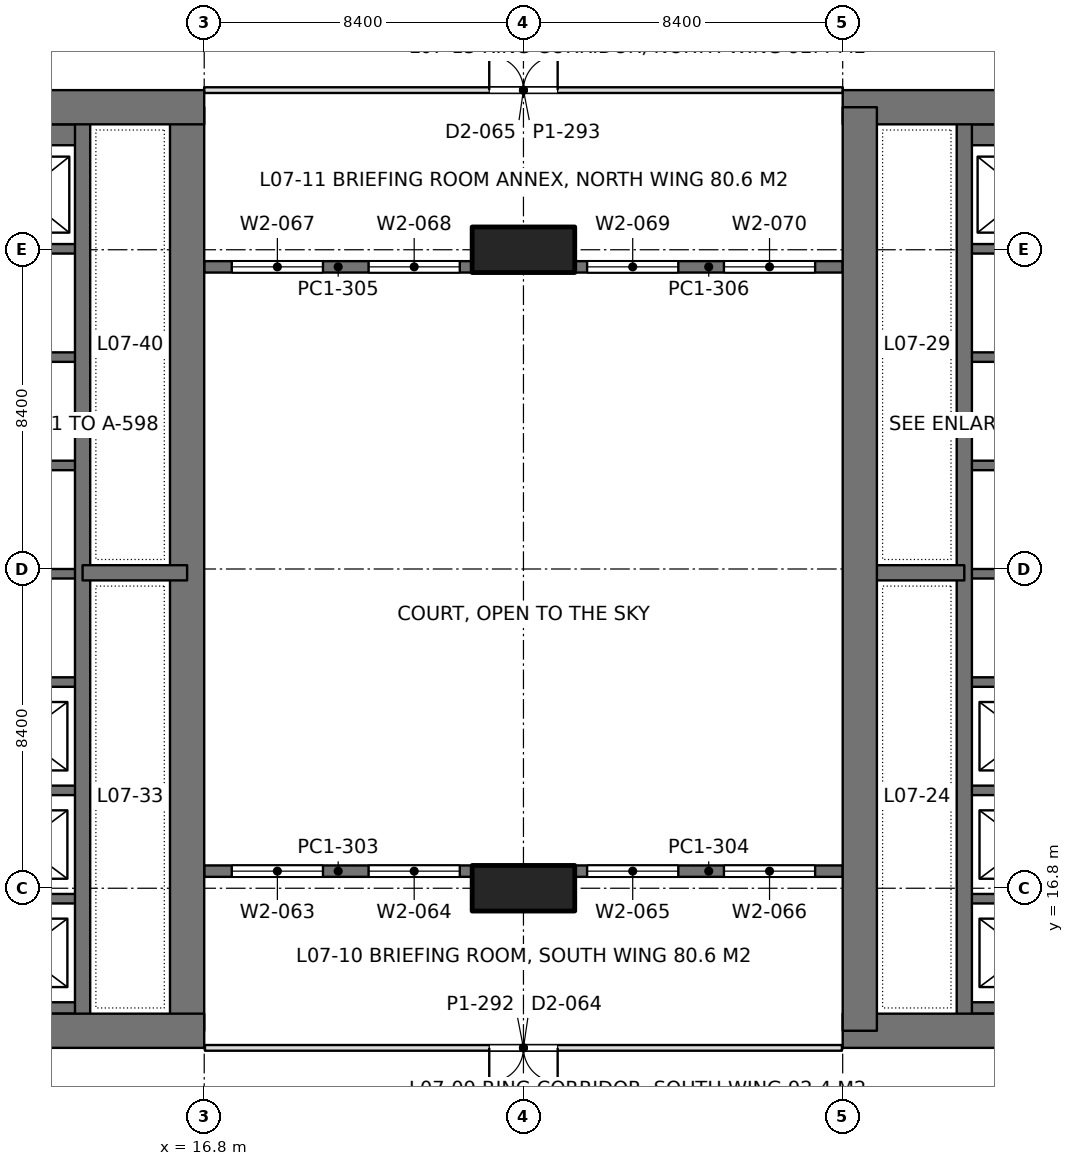
"""IFC4 building model, lengths in metres.
Left out: names, types, materials, properties, quantities, classifications, styles, units other than length and angle.
Written with IfcOpenShell. Run it as: python <this file> out.ifc"""

import sys

from ifc_helpers import new_model, si_unit, direction, frame, frame_2d, origin, origin_2d, place, context, subcontext, project, spatial, rectangle, extrude, element, fill, save


model = new_model("IFC4")
c1 = context("Model", 3, precision=1e-05, world=origin(), true_north=direction((0.0, 1.0)))
c2 = subcontext(c1, "Body", "Model", "MODEL_VIEW")
j1 = project(units=[si_unit("LENGTHUNIT", "METRE"), si_unit("PLANEANGLEUNIT", "RADIAN")], contexts=[c1])
p1 = place(None, origin())
s1 = spatial("IfcSite", under=j1, at=p1, CompositionType="ELEMENT")
p2 = place(p1, origin())
s2 = spatial("IfcBuilding", under=s1, at=p2, CompositionType="ELEMENT")
p3 = place(p2, frame((0.0, 0.0, 32.4)))
s3 = spatial("IfcBuildingStorey", under=s2, at=p3, CompositionType="ELEMENT", Elevation=32.4)
for number, where, z_axis, x_axis in (
    (1, (25.2, 16.8, 0.0), (0.0, 0.0, 1.0), (1.0, 0.0, 0.0)),
    (2, (25.2, 33.6, 0.0), (0.0, 0.0, 1.0), (1.0, 0.0, 0.0)),
):
    element("IfcColumn", number, at=place(p3, frame(where, z_axis=z_axis, x_axis=x_axis)), inside=s3, PredefinedType="COLUMN", context=c2, shape_type="SweptSolid", body=[
        extrude(rectangle(XDim=2.7, YDim=1.2, at=origin_2d()), origin(), (0.0, 0.0, 1.0), 4.5),
    ])
p4 = place(p3, frame((-1.2, 13.05, 0.0), z_axis=(0.0, 0.0, 1.0), x_axis=(1.0, 0.0, 0.0)))
e3 = element("IfcWall", 3, at=p4, inside=s3, PredefinedType="SHEAR", context=c2, shape_type="SweptSolid", body=[
    extrude(rectangle(XDim=18.0, YDim=0.9, at=frame_2d((9.0, 0.0))), origin(), (0.0, 0.0, 1.0), 4.5),
])
p5 = place(p4, frame((8.95, 0.0, 0.0)))
e4 = element("IfcOpeningElement", 4, at=p5, cuts=e3, PredefinedType="OPENING", context=c2, shape_type="SweptSolid", body=[
    extrude(rectangle(XDim=1.8, YDim=2.4, at=frame_2d((0.9, 1.2))), frame((0.0, 0.46, 0.0), z_axis=(0.0, -1.0, 0.0), x_axis=(1.0, 0.0, 0.0)), (0.0, 0.0, 1.0), 0.92),
])
p6 = place(p3, frame((-1.2, 37.35, 0.0), z_axis=(0.0, 0.0, 1.0), x_axis=(1.0, 0.0, 0.0)))
e5 = element("IfcWall", 5, at=p6, inside=s3, PredefinedType="SHEAR", context=c2, shape_type="SweptSolid", body=[
    extrude(rectangle(XDim=18.0, YDim=0.9, at=frame_2d((9.0, 0.0))), origin(), (0.0, 0.0, 1.0), 4.5),
])
p7 = place(p6, frame((8.95, 0.0, 0.0)))
e6 = element("IfcOpeningElement", 6, at=p7, cuts=e5, PredefinedType="OPENING", context=c2, shape_type="SweptSolid", body=[
    extrude(rectangle(XDim=1.8, YDim=2.4, at=frame_2d((0.9, 1.2))), frame((0.0, 0.46, 0.0), z_axis=(0.0, -1.0, 0.0), x_axis=(1.0, 0.0, 0.0)), (0.0, 0.0, 1.0), 0.92),
])
p8 = place(p3, frame((16.35, 13.05, 0.0), z_axis=(0.0, 0.0, 1.0), x_axis=(0.0, 1.0, 0.0)))
e7 = element("IfcWall", 7, at=p8, inside=s3, PredefinedType="SHEAR", context=c2, shape_type="SweptSolid", body=[
    extrude(rectangle(XDim=24.3, YDim=0.9, at=frame_2d((12.15, 0.0))), origin(), (0.0, 0.0, 1.0), 4.5),
])
p9 = place(p3, frame((13.6, 13.05, 0.0), z_axis=(0.0, 0.0, 1.0), x_axis=(0.0, 1.0, 0.0)))
e8 = element("IfcWall", 8, at=p9, inside=s3, PredefinedType="SHEAR", context=c2, shape_type="SweptSolid", body=[
    extrude(rectangle(XDim=24.3, YDim=0.4, at=frame_2d((12.15, 0.0))), origin(), (0.0, 0.0, 1.0), 4.5),
])
p10 = place(p3, frame((13.6, 25.1, 0.0), z_axis=(0.0, 0.0, 1.0), x_axis=(1.0, 0.0, 0.0)))
e9 = element("IfcWall", 9, at=p10, inside=s3, PredefinedType="SHEAR", context=c2, shape_type="SweptSolid", body=[
    extrude(rectangle(XDim=2.75, YDim=0.4, at=frame_2d((1.375, 0.0))), origin(), (0.0, 0.0, 1.0), 4.5),
])
p11 = place(p3, frame((10.4, 13.65, 0.0), z_axis=(0.0, 0.0, 1.0), x_axis=(1.0, 0.0, 0.0)))
e10 = element("IfcWall", 10, at=p11, inside=s3, PredefinedType="SHEAR", context=c2, shape_type="SweptSolid", body=[
    extrude(rectangle(XDim=3.2, YDim=0.3, at=frame_2d((1.6, 0.0))), origin(), (0.0, 0.0, 1.0), 4.5),
])
for number, where, z_axis, x_axis in (
    (11, (10.4, 16.525, 0.0), (0.0, 0.0, 1.0), (1.0, 0.0, 0.0)),
    (12, (10.4, 19.375, 0.0), (0.0, 0.0, 1.0), (1.0, 0.0, 0.0)),
    (13, (10.4, 22.225, 0.0), (0.0, 0.0, 1.0), (1.0, 0.0, 0.0)),
    (14, (10.4, 25.075, 0.0), (0.0, 0.0, 1.0), (1.0, 0.0, 0.0)),
    (15, (10.4, 27.925, 0.0), (0.0, 0.0, 1.0), (1.0, 0.0, 0.0)),
    (16, (10.4, 30.775, 0.0), (0.0, 0.0, 1.0), (1.0, 0.0, 0.0)),
    (17, (10.4, 33.625, 0.0), (0.0, 0.0, 1.0), (1.0, 0.0, 0.0)),
):
    element("IfcWall", number, at=place(p3, frame(where, z_axis=z_axis, x_axis=x_axis)), inside=s3, PredefinedType="SHEAR", context=c2, shape_type="SweptSolid", body=[
        extrude(rectangle(XDim=3.2, YDim=0.25, at=frame_2d((1.6, 0.0))), origin(), (0.0, 0.0, 1.0), 4.5),
    ])
p12 = place(p3, frame((10.4, 36.625, 0.0), z_axis=(0.0, 0.0, 1.0), x_axis=(1.0, 0.0, 0.0)))
e18 = element("IfcWall", 18, at=p12, inside=s3, PredefinedType="SHEAR", context=c2, shape_type="SweptSolid", body=[
    extrude(rectangle(XDim=3.2, YDim=0.55, at=frame_2d((1.6, 0.0))), origin(), (0.0, 0.0, 1.0), 4.5),
])
p13 = place(p3, frame((33.6, 13.05, 0.0), z_axis=(0.0, 0.0, 1.0), x_axis=(1.0, 0.0, 0.0)))
e19 = element("IfcWall", 19, at=p13, inside=s3, PredefinedType="SHEAR", context=c2, shape_type="SweptSolid", body=[
    extrude(rectangle(XDim=18.0, YDim=0.9, at=frame_2d((9.0, 0.0))), origin(), (0.0, 0.0, 1.0), 4.5),
])
p14 = place(p13, frame((7.25, 0.0, 0.0)))
e20 = element("IfcOpeningElement", 20, at=p14, cuts=e19, PredefinedType="OPENING", context=c2, shape_type="SweptSolid", body=[
    extrude(rectangle(XDim=1.8, YDim=2.4, at=frame_2d((0.9, 1.2))), frame((0.0, 0.46, 0.0), z_axis=(0.0, -1.0, 0.0), x_axis=(1.0, 0.0, 0.0)), (0.0, 0.0, 1.0), 0.92),
])
p15 = place(p3, frame((33.6, 37.35, 0.0), z_axis=(0.0, 0.0, 1.0), x_axis=(1.0, 0.0, 0.0)))
e21 = element("IfcWall", 21, at=p15, inside=s3, PredefinedType="SHEAR", context=c2, shape_type="SweptSolid", body=[
    extrude(rectangle(XDim=18.0, YDim=0.9, at=frame_2d((9.0, 0.0))), origin(), (0.0, 0.0, 1.0), 4.5),
])
p16 = place(p15, frame((7.25, 0.0, 0.0)))
e22 = element("IfcOpeningElement", 22, at=p16, cuts=e21, PredefinedType="OPENING", context=c2, shape_type="SweptSolid", body=[
    extrude(rectangle(XDim=1.8, YDim=2.4, at=frame_2d((0.9, 1.2))), frame((0.0, 0.46, 0.0), z_axis=(0.0, -1.0, 0.0), x_axis=(1.0, 0.0, 0.0)), (0.0, 0.0, 1.0), 0.92),
])
p17 = place(p3, frame((34.05, 13.05, 0.0), z_axis=(0.0, 0.0, 1.0), x_axis=(0.0, 1.0, 0.0)))
e23 = element("IfcWall", 23, at=p17, inside=s3, PredefinedType="SHEAR", context=c2, shape_type="SweptSolid", body=[
    extrude(rectangle(XDim=24.3, YDim=0.9, at=frame_2d((12.15, 0.0))), origin(), (0.0, 0.0, 1.0), 4.5),
])
p18 = place(p3, frame((36.8, 13.05, 0.0), z_axis=(0.0, 0.0, 1.0), x_axis=(0.0, 1.0, 0.0)))
e24 = element("IfcWall", 24, at=p18, inside=s3, PredefinedType="SHEAR", context=c2, shape_type="SweptSolid", body=[
    extrude(rectangle(XDim=24.3, YDim=0.4, at=frame_2d((12.15, 0.0))), origin(), (0.0, 0.0, 1.0), 4.5),
])
p19 = place(p3, frame((36.8, 25.1, 0.0), z_axis=(0.0, 0.0, 1.0), x_axis=(-1.0, 0.0, 0.0)))
e25 = element("IfcWall", 25, at=p19, inside=s3, PredefinedType="SHEAR", context=c2, shape_type="SweptSolid", body=[
    extrude(rectangle(XDim=2.75, YDim=0.4, at=frame_2d((1.375, 0.0))), origin(), (0.0, 0.0, 1.0), 4.5),
])
p20 = place(p3, frame((40.0, 13.65, 0.0), z_axis=(0.0, 0.0, 1.0), x_axis=(-1.0, 0.0, 0.0)))
e26 = element("IfcWall", 26, at=p20, inside=s3, PredefinedType="SHEAR", context=c2, shape_type="SweptSolid", body=[
    extrude(rectangle(XDim=3.2, YDim=0.3, at=frame_2d((1.6, 0.0))), origin(), (0.0, 0.0, 1.0), 4.5),
])
for number, where, z_axis, x_axis in (
    (27, (40.0, 16.525, 0.0), (0.0, 0.0, 1.0), (-1.0, 0.0, 0.0)),
    (28, (40.0, 19.375, 0.0), (0.0, 0.0, 1.0), (-1.0, 0.0, 0.0)),
    (29, (40.0, 22.225, 0.0), (0.0, 0.0, 1.0), (-1.0, 0.0, 0.0)),
    (30, (40.0, 25.075, 0.0), (0.0, 0.0, 1.0), (-1.0, 0.0, 0.0)),
    (31, (40.0, 27.925, 0.0), (0.0, 0.0, 1.0), (-1.0, 0.0, 0.0)),
    (32, (40.0, 30.775, 0.0), (0.0, 0.0, 1.0), (-1.0, 0.0, 0.0)),
    (33, (40.0, 33.625, 0.0), (0.0, 0.0, 1.0), (-1.0, 0.0, 0.0)),
):
    element("IfcWall", number, at=place(p3, frame(where, z_axis=z_axis, x_axis=x_axis)), inside=s3, PredefinedType="SHEAR", context=c2, shape_type="SweptSolid", body=[
        extrude(rectangle(XDim=3.2, YDim=0.25, at=frame_2d((1.6, 0.0))), origin(), (0.0, 0.0, 1.0), 4.5),
    ])
p21 = place(p3, frame((40.0, 36.625, 0.0), z_axis=(0.0, 0.0, 1.0), x_axis=(-1.0, 0.0, 0.0)))
e34 = element("IfcWall", 34, at=p21, inside=s3, PredefinedType="SHEAR", context=c2, shape_type="SweptSolid", body=[
    extrude(rectangle(XDim=3.2, YDim=0.55, at=frame_2d((1.6, 0.0))), origin(), (0.0, 0.0, 1.0), 4.5),
])
p22 = place(p3, frame((16.8, 17.25, 0.0), z_axis=(0.0, 0.0, 1.0), x_axis=(1.0, 0.0, 0.0)))
e35 = element("IfcWall", 35, at=p22, inside=s3, PredefinedType="SOLIDWALL", context=c2, shape_type="SweptSolid", body=[
    extrude(rectangle(XDim=7.05, YDim=0.3, at=frame_2d((3.525, 0.0))), origin(), (0.0, 0.0, 1.0), 4.34),
])
p23 = place(p22, frame((0.725, 0.0, 0.9)))
e36 = element("IfcOpeningElement", 36, at=p23, cuts=e35, PredefinedType="OPENING", context=c2, shape_type="SweptSolid", body=[
    extrude(rectangle(XDim=2.4, YDim=1.9, at=frame_2d((1.2, 0.95))), frame((0.0, 0.16, 0.0), z_axis=(0.0, -1.0, 0.0), x_axis=(1.0, 0.0, 0.0)), (0.0, 0.0, 1.0), 0.32),
])
p24 = place(p22, frame((4.325, 0.0, 0.9)))
e37 = element("IfcOpeningElement", 37, at=p24, cuts=e35, PredefinedType="OPENING", context=c2, shape_type="SweptSolid", body=[
    extrude(rectangle(XDim=2.4, YDim=1.9, at=frame_2d((1.2, 0.95))), frame((0.0, 0.16, 0.0), z_axis=(0.0, -1.0, 0.0), x_axis=(1.0, 0.0, 0.0)), (0.0, 0.0, 1.0), 0.32),
])
p25 = place(p3, frame((26.55, 17.25, 0.0), z_axis=(0.0, 0.0, 1.0), x_axis=(1.0, 0.0, 0.0)))
e38 = element("IfcWall", 38, at=p25, inside=s3, PredefinedType="SOLIDWALL", context=c2, shape_type="SweptSolid", body=[
    extrude(rectangle(XDim=7.05, YDim=0.3, at=frame_2d((3.525, 0.0))), origin(), (0.0, 0.0, 1.0), 4.34),
])
p26 = place(p25, frame((0.325, 0.0, 0.9)))
e39 = element("IfcOpeningElement", 39, at=p26, cuts=e38, PredefinedType="OPENING", context=c2, shape_type="SweptSolid", body=[
    extrude(rectangle(XDim=2.4, YDim=1.9, at=frame_2d((1.2, 0.95))), frame((0.0, 0.16, 0.0), z_axis=(0.0, -1.0, 0.0), x_axis=(1.0, 0.0, 0.0)), (0.0, 0.0, 1.0), 0.32),
])
p27 = place(p25, frame((3.925, 0.0, 0.9)))
e40 = element("IfcOpeningElement", 40, at=p27, cuts=e38, PredefinedType="OPENING", context=c2, shape_type="SweptSolid", body=[
    extrude(rectangle(XDim=2.4, YDim=1.9, at=frame_2d((1.2, 0.95))), frame((0.0, 0.16, 0.0), z_axis=(0.0, -1.0, 0.0), x_axis=(1.0, 0.0, 0.0)), (0.0, 0.0, 1.0), 0.32),
])
p28 = place(p3, frame((16.8, 33.15, 0.0), z_axis=(0.0, 0.0, 1.0), x_axis=(1.0, 0.0, 0.0)))
e41 = element("IfcWall", 41, at=p28, inside=s3, PredefinedType="SOLIDWALL", context=c2, shape_type="SweptSolid", body=[
    extrude(rectangle(XDim=7.05, YDim=0.3, at=frame_2d((3.525, 0.0))), origin(), (0.0, 0.0, 1.0), 4.34),
])
p29 = place(p28, frame((0.725, 0.0, 0.9)))
e42 = element("IfcOpeningElement", 42, at=p29, cuts=e41, PredefinedType="OPENING", context=c2, shape_type="SweptSolid", body=[
    extrude(rectangle(XDim=2.4, YDim=1.9, at=frame_2d((1.2, 0.95))), frame((0.0, 0.16, 0.0), z_axis=(0.0, -1.0, 0.0), x_axis=(1.0, 0.0, 0.0)), (0.0, 0.0, 1.0), 0.32),
])
p30 = place(p28, frame((4.325, 0.0, 0.9)))
e43 = element("IfcOpeningElement", 43, at=p30, cuts=e41, PredefinedType="OPENING", context=c2, shape_type="SweptSolid", body=[
    extrude(rectangle(XDim=2.4, YDim=1.9, at=frame_2d((1.2, 0.95))), frame((0.0, 0.16, 0.0), z_axis=(0.0, -1.0, 0.0), x_axis=(1.0, 0.0, 0.0)), (0.0, 0.0, 1.0), 0.32),
])
p31 = place(p3, frame((26.55, 33.15, 0.0), z_axis=(0.0, 0.0, 1.0), x_axis=(1.0, 0.0, 0.0)))
e44 = element("IfcWall", 44, at=p31, inside=s3, PredefinedType="SOLIDWALL", context=c2, shape_type="SweptSolid", body=[
    extrude(rectangle(XDim=7.05, YDim=0.3, at=frame_2d((3.525, 0.0))), origin(), (0.0, 0.0, 1.0), 4.34),
])
p32 = place(p31, frame((0.325, 0.0, 0.9)))
e45 = element("IfcOpeningElement", 45, at=p32, cuts=e44, PredefinedType="OPENING", context=c2, shape_type="SweptSolid", body=[
    extrude(rectangle(XDim=2.4, YDim=1.9, at=frame_2d((1.2, 0.95))), frame((0.0, 0.16, 0.0), z_axis=(0.0, -1.0, 0.0), x_axis=(1.0, 0.0, 0.0)), (0.0, 0.0, 1.0), 0.32),
])
p33 = place(p31, frame((3.925, 0.0, 0.9)))
e46 = element("IfcOpeningElement", 46, at=p33, cuts=e44, PredefinedType="OPENING", context=c2, shape_type="SweptSolid", body=[
    extrude(rectangle(XDim=2.4, YDim=1.9, at=frame_2d((1.2, 0.95))), frame((0.0, 0.16, 0.0), z_axis=(0.0, -1.0, 0.0), x_axis=(1.0, 0.0, 0.0)), (0.0, 0.0, 1.0), 0.32),
])
p34 = place(p3, frame((16.82, 12.6, 0.0), z_axis=(0.0, 0.0, 1.0), x_axis=(1.0, 0.0, 0.0)))
e47 = element("IfcWall", 47, at=p34, inside=s3, PredefinedType="PARTITIONING", context=c2, shape_type="SweptSolid", body=[
    extrude(rectangle(XDim=16.76, YDim=0.15, at=frame_2d((8.38, 0.0))), origin(), (0.0, 0.0, 1.0), 3.74),
])
p35 = place(p34, frame((7.48, 0.0, 0.0)))
e48 = element("IfcOpeningElement", 48, at=p35, cuts=e47, PredefinedType="OPENING", context=c2, shape_type="SweptSolid", body=[
    extrude(rectangle(XDim=1.8, YDim=2.2, at=frame_2d((0.9, 1.1))), frame((0.0, 0.085, 0.0), z_axis=(0.0, -1.0, 0.0), x_axis=(1.0, 0.0, 0.0)), (0.0, 0.0, 1.0), 0.17),
])
p36 = place(p3, frame((16.798, 37.8, 0.0), z_axis=(0.0, 0.0, 1.0), x_axis=(1.0, 0.0, 0.0)))
e49 = element("IfcWall", 49, at=p36, inside=s3, PredefinedType="PARTITIONING", context=c2, shape_type="SweptSolid", body=[
    extrude(rectangle(XDim=16.804, YDim=0.15, at=frame_2d((8.402, 0.0))), origin(), (0.0, 0.0, 1.0), 3.74),
])
p37 = place(p36, frame((7.502, 0.0, 0.0)))
e50 = element("IfcOpeningElement", 50, at=p37, cuts=e49, PredefinedType="OPENING", context=c2, shape_type="SweptSolid", body=[
    extrude(rectangle(XDim=1.8, YDim=2.2, at=frame_2d((0.9, 1.1))), frame((0.0, 0.085, 0.0), z_axis=(0.0, -1.0, 0.0), x_axis=(1.0, 0.0, 0.0)), (0.0, 0.0, 1.0), 0.17),
])
p38 = place(p23, origin())
e51 = element("IfcWindow", 51, at=p38, inside=s3, PartitioningType="SINGLE_PANEL", PredefinedType="WINDOW", context=c2, shape_type="SweptSolid", body=[
    extrude(rectangle(XDim=2.4, YDim=1.9, at=frame_2d((1.2, 0.95))), frame((0.0, 0.03, 0.0), z_axis=(0.0, -1.0, 0.0), x_axis=(1.0, 0.0, 0.0)), (0.0, 0.0, 1.0), 0.06),
])
fill(e36, e51)
p39 = place(p24, origin())
e52 = element("IfcWindow", 52, at=p39, inside=s3, PartitioningType="SINGLE_PANEL", PredefinedType="WINDOW", context=c2, shape_type="SweptSolid", body=[
    extrude(rectangle(XDim=2.4, YDim=1.9, at=frame_2d((1.2, 0.95))), frame((0.0, 0.03, 0.0), z_axis=(0.0, -1.0, 0.0), x_axis=(1.0, 0.0, 0.0)), (0.0, 0.0, 1.0), 0.06),
])
fill(e37, e52)
p40 = place(p26, origin())
e53 = element("IfcWindow", 53, at=p40, inside=s3, PartitioningType="SINGLE_PANEL", PredefinedType="WINDOW", context=c2, shape_type="SweptSolid", body=[
    extrude(rectangle(XDim=2.4, YDim=1.9, at=frame_2d((1.2, 0.95))), frame((0.0, 0.03, 0.0), z_axis=(0.0, -1.0, 0.0), x_axis=(1.0, 0.0, 0.0)), (0.0, 0.0, 1.0), 0.06),
])
fill(e39, e53)
p41 = place(p27, origin())
e54 = element("IfcWindow", 54, at=p41, inside=s3, PartitioningType="SINGLE_PANEL", PredefinedType="WINDOW", context=c2, shape_type="SweptSolid", body=[
    extrude(rectangle(XDim=2.4, YDim=1.9, at=frame_2d((1.2, 0.95))), frame((0.0, 0.03, 0.0), z_axis=(0.0, -1.0, 0.0), x_axis=(1.0, 0.0, 0.0)), (0.0, 0.0, 1.0), 0.06),
])
fill(e40, e54)
p42 = place(p29, origin())
e55 = element("IfcWindow", 55, at=p42, inside=s3, PartitioningType="SINGLE_PANEL", PredefinedType="WINDOW", context=c2, shape_type="SweptSolid", body=[
    extrude(rectangle(XDim=2.4, YDim=1.9, at=frame_2d((1.2, 0.95))), frame((0.0, 0.03, 0.0), z_axis=(0.0, -1.0, 0.0), x_axis=(1.0, 0.0, 0.0)), (0.0, 0.0, 1.0), 0.06),
])
fill(e42, e55)
p43 = place(p30, origin())
e56 = element("IfcWindow", 56, at=p43, inside=s3, PartitioningType="SINGLE_PANEL", PredefinedType="WINDOW", context=c2, shape_type="SweptSolid", body=[
    extrude(rectangle(XDim=2.4, YDim=1.9, at=frame_2d((1.2, 0.95))), frame((0.0, 0.03, 0.0), z_axis=(0.0, -1.0, 0.0), x_axis=(1.0, 0.0, 0.0)), (0.0, 0.0, 1.0), 0.06),
])
fill(e43, e56)
p44 = place(p32, origin())
e57 = element("IfcWindow", 57, at=p44, inside=s3, PartitioningType="SINGLE_PANEL", PredefinedType="WINDOW", context=c2, shape_type="SweptSolid", body=[
    extrude(rectangle(XDim=2.4, YDim=1.9, at=frame_2d((1.2, 0.95))), frame((0.0, 0.03, 0.0), z_axis=(0.0, -1.0, 0.0), x_axis=(1.0, 0.0, 0.0)), (0.0, 0.0, 1.0), 0.06),
])
fill(e45, e57)
p45 = place(p33, origin())
e58 = element("IfcWindow", 58, at=p45, inside=s3, PartitioningType="SINGLE_PANEL", PredefinedType="WINDOW", context=c2, shape_type="SweptSolid", body=[
    extrude(rectangle(XDim=2.4, YDim=1.9, at=frame_2d((1.2, 0.95))), frame((0.0, 0.03, 0.0), z_axis=(0.0, -1.0, 0.0), x_axis=(1.0, 0.0, 0.0)), (0.0, 0.0, 1.0), 0.06),
])
fill(e46, e58)
p46 = place(p35, frame((1.8, 0.0, 0.0), z_axis=(0.0, 0.0, 1.0), x_axis=(-1.0, 0.0, 0.0)))
e59 = element("IfcDoor", 59, at=p46, inside=s3, OperationType="DOUBLE_DOOR_SINGLE_SWING", PredefinedType="DOOR", context=c2, shape_type="SweptSolid", body=[
    extrude(rectangle(XDim=1.8, YDim=2.2, at=frame_2d((0.9, 1.1))), frame((0.0, 0.025, 0.0), z_axis=(0.0, -1.0, 0.0), x_axis=(1.0, 0.0, 0.0)), (0.0, 0.0, 1.0), 0.05),
])
fill(e48, e59)
p47 = place(p37, origin())
e60 = element("IfcDoor", 60, at=p47, inside=s3, OperationType="DOUBLE_DOOR_SINGLE_SWING", PredefinedType="DOOR", context=c2, shape_type="SweptSolid", body=[
    extrude(rectangle(XDim=1.8, YDim=2.2, at=frame_2d((0.9, 1.1))), frame((0.0, 0.025, 0.0), z_axis=(0.0, -1.0, 0.0), x_axis=(1.0, 0.0, 0.0)), (0.0, 0.0, 1.0), 0.05),
])
fill(e50, e60)
save(model, sys.argv[1])
